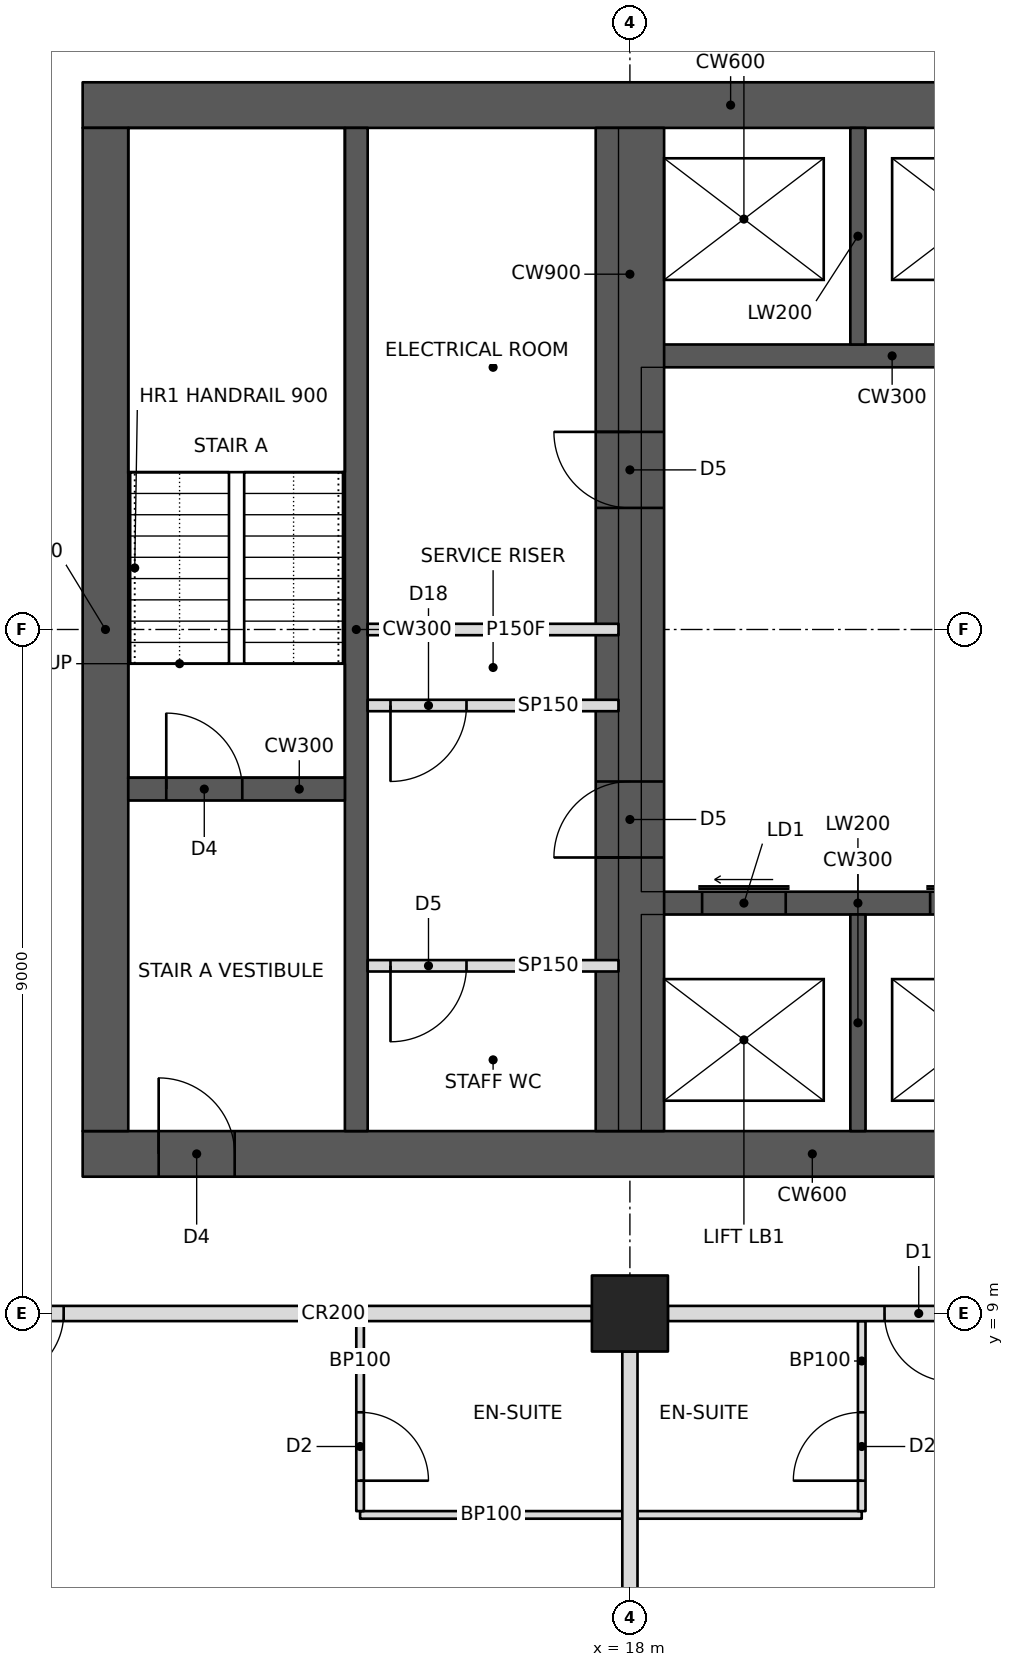
"""IFC4 building model, lengths in metres.
Left out: names, types, materials, properties, quantities, classifications, styles, units other than length and angle.
Written with IfcOpenShell. Run it as: python <this file> out.ifc"""

import sys

from ifc_helpers import new_model, si_unit, direction, frame, frame_2d, origin, origin_2d, place, context, subcontext, project, spatial, rectangle, hollow_rectangle, extrude, element, fill, save


model = new_model("IFC4")
c1 = context("Model", 3, precision=1e-05, world=origin(), true_north=direction((0.0, 1.0)))
c2 = subcontext(c1, "Body", "Model", "MODEL_VIEW")
j1 = project(units=[si_unit("LENGTHUNIT", "METRE"), si_unit("PLANEANGLEUNIT", "RADIAN")], contexts=[c1])
p1 = place(None, origin())
s1 = spatial("IfcSite", under=j1, at=p1, CompositionType="ELEMENT")
p2 = place(p1, origin())
s2 = spatial("IfcBuilding", under=s1, at=p2, CompositionType="ELEMENT")
p3 = place(p2, frame((0.0, 0.0, 152.0)))
s3 = spatial("IfcBuildingStorey", under=s2, at=p3, CompositionType="ELEMENT", Elevation=152.0)
p4 = place(p3, frame((18.0, 9.0, 0.0), z_axis=(0.0, 0.0, 1.0), x_axis=(1.0, 0.0, 0.0)))
e1 = element("IfcColumn", 1, at=p4, inside=s3, PredefinedType="COLUMN", context=c2, shape_type="SweptSolid", body=[
    extrude(hollow_rectangle(XDim=1.0, YDim=1.0, WallThickness=0.1, at=origin_2d()), origin(), (0.0, 0.0, 1.0), 3.4),
])
p5 = place(p3, frame((10.8, 11.1, 0.0), z_axis=(0.0, 0.0, 1.0), x_axis=(1.0, 0.0, 0.0)))
e2 = element("IfcWall", 2, at=p5, inside=s3, PredefinedType="SHEAR", context=c2, shape_type="SweptSolid", body=[
    extrude(rectangle(XDim=23.4, YDim=0.6, at=frame_2d((11.7, 0.0))), origin(), (0.0, 0.0, 1.0), 3.4),
])
p6 = place(p5, frame((1.0, 0.0, 0.0)))
e3 = element("IfcOpeningElement", 3, at=p6, cuts=e2, PredefinedType="OPENING", context=c2, shape_type="SweptSolid", body=[
    extrude(rectangle(XDim=1.0, YDim=2.1, at=frame_2d((0.5, 1.05))), frame((0.0, 0.31, 0.0), z_axis=(0.0, -1.0, 0.0), x_axis=(1.0, 0.0, 0.0)), (0.0, 0.0, 1.0), 0.62),
])
p7 = place(p5, frame((17.2, 0.0, 0.0)))
e4 = element("IfcOpeningElement", 4, at=p7, cuts=e2, PredefinedType="OPENING", context=c2, shape_type="SweptSolid", body=[
    extrude(rectangle(XDim=1.8, YDim=2.1, at=frame_2d((0.9, 1.05))), frame((0.0, 0.31, 0.0), z_axis=(0.0, -1.0, 0.0), x_axis=(1.0, 0.0, 0.0)), (0.0, 0.0, 1.0), 0.62),
])
p8 = place(p3, frame((10.8, 24.9, 0.0), z_axis=(0.0, 0.0, 1.0), x_axis=(1.0, 0.0, 0.0)))
e5 = element("IfcWall", 5, at=p8, inside=s3, PredefinedType="SHEAR", context=c2, shape_type="SweptSolid", body=[
    extrude(rectangle(XDim=23.4, YDim=0.6, at=frame_2d((11.7, 0.0))), origin(), (0.0, 0.0, 1.0), 3.4),
])
p9 = place(p8, frame((17.2, 0.0, 0.0)))
e6 = element("IfcOpeningElement", 6, at=p9, cuts=e5, PredefinedType="OPENING", context=c2, shape_type="SweptSolid", body=[
    extrude(rectangle(XDim=1.8, YDim=2.1, at=frame_2d((0.9, 1.05))), frame((0.0, 0.31, 0.0), z_axis=(0.0, -1.0, 0.0), x_axis=(1.0, 0.0, 0.0)), (0.0, 0.0, 1.0), 0.62),
])
p10 = place(p8, frame((21.1, 0.0, 0.0)))
e7 = element("IfcOpeningElement", 7, at=p10, cuts=e5, PredefinedType="OPENING", context=c2, shape_type="SweptSolid", body=[
    extrude(rectangle(XDim=1.0, YDim=2.1, at=frame_2d((0.5, 1.05))), frame((0.0, 0.31, 0.0), z_axis=(0.0, -1.0, 0.0), x_axis=(1.0, 0.0, 0.0)), (0.0, 0.0, 1.0), 0.62),
])
p11 = place(p3, frame((11.1, 11.4, 0.0), z_axis=(0.0, 0.0, 1.0), x_axis=(0.0, 1.0, 0.0)))
e8 = element("IfcWall", 8, at=p11, inside=s3, PredefinedType="SHEAR", context=c2, shape_type="SweptSolid", body=[
    extrude(rectangle(XDim=13.2, YDim=0.6, at=frame_2d((6.6, 0.0))), origin(), (0.0, 0.0, 1.0), 3.4),
])
p12 = place(p3, frame((14.4, 11.4, 0.0), z_axis=(0.0, 0.0, 1.0), x_axis=(0.0, 1.0, 0.0)))
e9 = element("IfcWall", 9, at=p12, inside=s3, PredefinedType="SHEAR", context=c2, shape_type="SweptSolid", body=[
    extrude(rectangle(XDim=13.2, YDim=0.3, at=frame_2d((6.6, 0.0))), origin(), (0.0, 0.0, 1.0), 3.4),
])
p13 = place(p3, frame((11.4, 15.9, 0.0), z_axis=(0.0, 0.0, 1.0), x_axis=(1.0, 0.0, 0.0)))
e10 = element("IfcWall", 10, at=p13, inside=s3, PredefinedType="SHEAR", context=c2, shape_type="SweptSolid", body=[
    extrude(rectangle(XDim=2.85, YDim=0.3, at=frame_2d((1.425, 0.0))), origin(), (0.0, 0.0, 1.0), 3.4),
])
p14 = place(p13, frame((0.5, 0.0, 0.0)))
e11 = element("IfcOpeningElement", 11, at=p14, cuts=e10, PredefinedType="OPENING", context=c2, shape_type="SweptSolid", body=[
    extrude(rectangle(XDim=1.0, YDim=2.1, at=frame_2d((0.5, 1.05))), frame((0.0, 0.16, 0.0), z_axis=(0.0, -1.0, 0.0), x_axis=(1.0, 0.0, 0.0)), (0.0, 0.0, 1.0), 0.32),
])
p15 = place(p3, frame((18.0, 11.4, 0.0), z_axis=(0.0, 0.0, 1.0), x_axis=(0.0, 1.0, 0.0)))
e12 = element("IfcWall", 12, at=p15, inside=s3, PredefinedType="SHEAR", context=c2, shape_type="SweptSolid", body=[
    extrude(rectangle(XDim=13.2, YDim=0.9, at=frame_2d((6.6, 0.0))), origin(), (0.0, 0.0, 1.0), 3.4),
])
p16 = place(p15, frame((3.6, 0.0, 0.0)))
e13 = element("IfcOpeningElement", 13, at=p16, cuts=e12, PredefinedType="OPENING", context=c2, shape_type="SweptSolid", body=[
    extrude(rectangle(XDim=1.0, YDim=2.1, at=frame_2d((0.5, 1.05))), frame((0.0, 0.46, 0.0), z_axis=(0.0, -1.0, 0.0), x_axis=(1.0, 0.0, 0.0)), (0.0, 0.0, 1.0), 0.92),
])
p17 = place(p15, frame((8.2, 0.0, 0.0)))
e14 = element("IfcOpeningElement", 14, at=p17, cuts=e12, PredefinedType="OPENING", context=c2, shape_type="SweptSolid", body=[
    extrude(rectangle(XDim=1.0, YDim=2.1, at=frame_2d((0.5, 1.05))), frame((0.0, 0.46, 0.0), z_axis=(0.0, -1.0, 0.0), x_axis=(1.0, 0.0, 0.0)), (0.0, 0.0, 1.0), 0.92),
])
p18 = place(p3, frame((14.55, 18.0, 0.0), z_axis=(0.0, 0.0, 1.0), x_axis=(1.0, 0.0, 0.0)))
e15 = element("IfcWall", 15, at=p18, inside=s3, PredefinedType="PARTITIONING", context=c2, shape_type="SweptSolid", body=[
    extrude(rectangle(XDim=3.3, YDim=0.15, at=frame_2d((1.65, 0.0))), origin(), (0.0, 0.0, 1.0), 3.15),
])
p19 = place(p3, frame((18.15, 14.4, 0.0), z_axis=(0.0, 0.0, 1.0), x_axis=(1.0, 0.0, 0.0)))
e16 = element("IfcWall", 16, at=p19, inside=s3, PredefinedType="SHEAR", context=c2, shape_type="SweptSolid", body=[
    extrude(rectangle(XDim=9.0, YDim=0.3, at=frame_2d((4.5, 0.0))), origin(), (0.0, 0.0, 1.0), 3.4),
])
p20 = place(p19, frame((0.8, 0.0, 0.0)))
e17 = element("IfcOpeningElement", 17, at=p20, cuts=e16, PredefinedType="OPENING", context=c2, shape_type="SweptSolid", body=[
    extrude(rectangle(XDim=1.1, YDim=2.1, at=frame_2d((0.55, 1.05))), frame((0.0, 0.16, 0.0), z_axis=(0.0, -1.0, 0.0), x_axis=(1.0, 0.0, 0.0)), (0.0, 0.0, 1.0), 0.32),
])
p21 = place(p19, frame((3.8, 0.0, 0.0)))
e18 = element("IfcOpeningElement", 18, at=p21, cuts=e16, PredefinedType="OPENING", context=c2, shape_type="SweptSolid", body=[
    extrude(rectangle(XDim=1.1, YDim=2.1, at=frame_2d((0.55, 1.05))), frame((0.0, 0.16, 0.0), z_axis=(0.0, -1.0, 0.0), x_axis=(1.0, 0.0, 0.0)), (0.0, 0.0, 1.0), 0.32),
])
p22 = place(p19, frame((6.75, 0.0, 0.0)))
e19 = element("IfcOpeningElement", 19, at=p22, cuts=e16, PredefinedType="OPENING", context=c2, shape_type="SweptSolid", body=[
    extrude(rectangle(XDim=1.2, YDim=2.1, at=frame_2d((0.6, 1.05))), frame((0.0, 0.16, 0.0), z_axis=(0.0, -1.0, 0.0), x_axis=(1.0, 0.0, 0.0)), (0.0, 0.0, 1.0), 0.32),
])
p23 = place(p3, frame((21.0, 11.4, 0.0), z_axis=(0.0, 0.0, 1.0), x_axis=(0.0, 1.0, 0.0)))
e20 = element("IfcWall", 20, at=p23, inside=s3, PredefinedType="SHEAR", context=c2, shape_type="SweptSolid", body=[
    extrude(rectangle(XDim=2.85, YDim=0.2, at=frame_2d((1.425, 0.0))), origin(), (0.0, 0.0, 1.0), 3.4),
])
p24 = place(p3, frame((18.15, 21.6, 0.0), z_axis=(0.0, 0.0, 1.0), x_axis=(1.0, 0.0, 0.0)))
e21 = element("IfcWall", 21, at=p24, inside=s3, PredefinedType="SHEAR", context=c2, shape_type="SweptSolid", body=[
    extrude(rectangle(XDim=9.0, YDim=0.3, at=frame_2d((4.5, 0.0))), origin(), (0.0, 0.0, 1.0), 3.4),
])
p25 = place(p24, frame((6.75, 0.0, 0.0)))
e22 = element("IfcOpeningElement", 22, at=p25, cuts=e21, PredefinedType="OPENING", context=c2, shape_type="SweptSolid", body=[
    extrude(rectangle(XDim=1.2, YDim=2.1, at=frame_2d((0.6, 1.05))), frame((0.0, 0.16, 0.0), z_axis=(0.0, -1.0, 0.0), x_axis=(1.0, 0.0, 0.0)), (0.0, 0.0, 1.0), 0.32),
])
p26 = place(p3, frame((21.0, 21.75, 0.0), z_axis=(0.0, 0.0, 1.0), x_axis=(0.0, 1.0, 0.0)))
e23 = element("IfcWall", 23, at=p26, inside=s3, PredefinedType="SHEAR", context=c2, shape_type="SweptSolid", body=[
    extrude(rectangle(XDim=2.85, YDim=0.2, at=frame_2d((1.425, 0.0))), origin(), (0.0, 0.0, 1.0), 3.4),
])
p27 = place(p3, frame((9.5, 9.0, 0.0), z_axis=(0.0, 0.0, 1.0), x_axis=(1.0, 0.0, 0.0)))
e24 = element("IfcWall", 24, at=p27, inside=s3, PredefinedType="PARTITIONING", context=c2, shape_type="SweptSolid", body=[
    extrude(rectangle(XDim=8.0, YDim=0.2, at=frame_2d((4.0, 0.0))), origin(), (0.0, 0.0, 1.0), 2.21),
])
p28 = place(p27, frame((0.15, 0.0, 0.0)))
e25 = element("IfcOpeningElement", 25, at=p28, cuts=e24, PredefinedType="OPENING", context=c2, shape_type="SweptSolid", body=[
    extrude(rectangle(XDim=0.9, YDim=2.1, at=frame_2d((0.45, 1.05))), frame((0.0, 0.11, 0.0), z_axis=(0.0, -1.0, 0.0), x_axis=(1.0, 0.0, 0.0)), (0.0, 0.0, 1.0), 0.22),
])
p29 = place(p3, frame((18.5, 9.0, 0.0), z_axis=(0.0, 0.0, 1.0), x_axis=(1.0, 0.0, 0.0)))
e26 = element("IfcWall", 26, at=p29, inside=s3, PredefinedType="PARTITIONING", context=c2, shape_type="SweptSolid", body=[
    extrude(rectangle(XDim=8.0, YDim=0.2, at=frame_2d((4.0, 0.0))), origin(), (0.0, 0.0, 1.0), 2.21),
])
p30 = place(p29, frame((2.85, 0.0, 0.0)))
e27 = element("IfcOpeningElement", 27, at=p30, cuts=e26, PredefinedType="OPENING", context=c2, shape_type="SweptSolid", body=[
    extrude(rectangle(XDim=0.9, YDim=2.1, at=frame_2d((0.45, 1.05))), frame((0.0, 0.11, 0.0), z_axis=(0.0, -1.0, 0.0), x_axis=(1.0, 0.0, 0.0)), (0.0, 0.0, 1.0), 0.22),
])
p31 = place(p29, frame((4.25, 0.0, 0.0)))
e28 = element("IfcOpeningElement", 28, at=p31, cuts=e26, PredefinedType="OPENING", context=c2, shape_type="SweptSolid", body=[
    extrude(rectangle(XDim=0.9, YDim=2.1, at=frame_2d((0.45, 1.05))), frame((0.0, 0.11, 0.0), z_axis=(0.0, -1.0, 0.0), x_axis=(1.0, 0.0, 0.0)), (0.0, 0.0, 1.0), 0.22),
])
p32 = place(p3, frame((18.0, 8.5, 0.0), z_axis=(0.0, 0.0, 1.0), x_axis=(0.0, -1.0, 0.0)))
e29 = element("IfcWall", 29, at=p32, inside=s3, PredefinedType="PARTITIONING", context=c2, shape_type="SweptSolid", body=[
    extrude(rectangle(XDim=7.5, YDim=0.2, at=frame_2d((3.75, 0.0))), origin(), (0.0, 0.0, 1.0), 2.203),
])
p33 = place(p3, frame((14.45, 6.35, 0.0), z_axis=(0.0, 0.0, 1.0), x_axis=(1.0, 0.0, 0.0)))
e30 = element("IfcWall", 30, at=p33, inside=s3, PredefinedType="PARTITIONING", context=c2, shape_type="SweptSolid", body=[
    extrude(rectangle(XDim=3.45, YDim=0.1, at=frame_2d((1.725, 0.0))), origin(), (0.0, 0.0, 1.0), 2.202),
])
p34 = place(p3, frame((14.45, 8.9, 0.0), z_axis=(0.0, 0.0, 1.0), x_axis=(0.0, -1.0, 0.0)))
e31 = element("IfcWall", 31, at=p34, inside=s3, PredefinedType="PARTITIONING", context=c2, shape_type="SweptSolid", body=[
    extrude(rectangle(XDim=2.5, YDim=0.1, at=frame_2d((1.25, 0.0))), origin(), (0.0, 0.0, 1.0), 2.21),
])
p35 = place(p34, frame((1.2, 0.0, 0.0)))
e32 = element("IfcOpeningElement", 32, at=p35, cuts=e31, PredefinedType="OPENING", context=c2, shape_type="SweptSolid", body=[
    extrude(rectangle(XDim=0.9, YDim=2.1, at=frame_2d((0.45, 1.05))), frame((0.0, 0.06, 0.0), z_axis=(0.0, -1.0, 0.0), x_axis=(1.0, 0.0, 0.0)), (0.0, 0.0, 1.0), 0.12),
])
p36 = place(p3, frame((18.1, 6.35, 0.0), z_axis=(0.0, 0.0, 1.0), x_axis=(1.0, 0.0, 0.0)))
e33 = element("IfcWall", 33, at=p36, inside=s3, PredefinedType="PARTITIONING", context=c2, shape_type="SweptSolid", body=[
    extrude(rectangle(XDim=2.95, YDim=0.1, at=frame_2d((1.475, 0.0))), origin(), (0.0, 0.0, 1.0), 2.202),
])
p37 = place(p3, frame((21.05, 8.9, 0.0), z_axis=(0.0, 0.0, 1.0), x_axis=(0.0, -1.0, 0.0)))
e34 = element("IfcWall", 34, at=p37, inside=s3, PredefinedType="PARTITIONING", context=c2, shape_type="SweptSolid", body=[
    extrude(rectangle(XDim=2.5, YDim=0.1, at=frame_2d((1.25, 0.0))), origin(), (0.0, 0.0, 1.0), 2.21),
])
p38 = place(p37, frame((1.2, 0.0, 0.0)))
e35 = element("IfcOpeningElement", 35, at=p38, cuts=e34, PredefinedType="OPENING", context=c2, shape_type="SweptSolid", body=[
    extrude(rectangle(XDim=0.9, YDim=2.1, at=frame_2d((0.45, 1.05))), frame((0.0, 0.06, 0.0), z_axis=(0.0, -1.0, 0.0), x_axis=(1.0, 0.0, 0.0)), (0.0, 0.0, 1.0), 0.12),
])
p39 = place(p3, frame((14.55, 17.0, 0.0), z_axis=(0.0, 0.0, 1.0), x_axis=(1.0, 0.0, 0.0)))
e36 = element("IfcWall", 36, at=p39, inside=s3, PredefinedType="PARTITIONING", context=c2, shape_type="SweptSolid", body=[
    extrude(rectangle(XDim=3.3, YDim=0.15, at=frame_2d((1.65, 0.0))), origin(), (0.0, 0.0, 1.0), 3.15),
])
p40 = place(p39, frame((0.3, 0.0, 0.0)))
e37 = element("IfcOpeningElement", 37, at=p40, cuts=e36, PredefinedType="OPENING", context=c2, shape_type="SweptSolid", body=[
    extrude(rectangle(XDim=1.0, YDim=2.1, at=frame_2d((0.5, 1.05))), frame((0.0, 0.085, 0.0), z_axis=(0.0, -1.0, 0.0), x_axis=(1.0, 0.0, 0.0)), (0.0, 0.0, 1.0), 0.17),
])
p41 = place(p3, frame((14.55, 13.575, 0.0), z_axis=(0.0, 0.0, 1.0), x_axis=(1.0, 0.0, 0.0)))
e38 = element("IfcWall", 38, at=p41, inside=s3, PredefinedType="PARTITIONING", context=c2, shape_type="SweptSolid", body=[
    extrude(rectangle(XDim=3.3, YDim=0.15, at=frame_2d((1.65, 0.0))), origin(), (0.0, 0.0, 1.0), 3.15),
])
p42 = place(p41, frame((0.3, 0.0, 0.0)))
e39 = element("IfcOpeningElement", 39, at=p42, cuts=e38, PredefinedType="OPENING", context=c2, shape_type="SweptSolid", body=[
    extrude(rectangle(XDim=1.0, YDim=2.1, at=frame_2d((0.5, 1.05))), frame((0.0, 0.085, 0.0), z_axis=(0.0, -1.0, 0.0), x_axis=(1.0, 0.0, 0.0)), (0.0, 0.0, 1.0), 0.17),
])
p43 = place(p35, origin())
e40 = element("IfcDoor", 40, at=p43, inside=s3, OperationType="SINGLE_SWING_RIGHT", PredefinedType="DOOR", context=c2, shape_type="SweptSolid", body=[
    extrude(rectangle(XDim=0.9, YDim=2.1, at=frame_2d((0.45, 1.05))), frame((0.0, 0.025, 0.0), z_axis=(0.0, -1.0, 0.0), x_axis=(1.0, 0.0, 0.0)), (0.0, 0.0, 1.0), 0.05),
])
fill(e32, e40)
p44 = place(p28, frame((0.9, 0.0, 0.0), z_axis=(0.0, 0.0, 1.0), x_axis=(-1.0, 0.0, 0.0)))
e41 = element("IfcDoor", 41, at=p44, inside=s3, OperationType="SINGLE_SWING_RIGHT", PredefinedType="DOOR", context=c2, shape_type="SweptSolid", body=[
    extrude(rectangle(XDim=0.9, YDim=2.1, at=frame_2d((0.45, 1.05))), frame((0.0, 0.025, 0.0), z_axis=(0.0, -1.0, 0.0), x_axis=(1.0, 0.0, 0.0)), (0.0, 0.0, 1.0), 0.05),
])
fill(e25, e41)
p45 = place(p38, frame((0.9, 0.0, 0.0), z_axis=(0.0, 0.0, 1.0), x_axis=(-1.0, 0.0, 0.0)))
e42 = element("IfcDoor", 42, at=p45, inside=s3, OperationType="SINGLE_SWING_LEFT", PredefinedType="DOOR", context=c2, shape_type="SweptSolid", body=[
    extrude(rectangle(XDim=0.9, YDim=2.1, at=frame_2d((0.45, 1.05))), frame((0.0, 0.025, 0.0), z_axis=(0.0, -1.0, 0.0), x_axis=(1.0, 0.0, 0.0)), (0.0, 0.0, 1.0), 0.05),
])
fill(e35, e42)
p46 = place(p30, frame((0.9, 0.0, 0.0), z_axis=(0.0, 0.0, 1.0), x_axis=(-1.0, 0.0, 0.0)))
e43 = element("IfcDoor", 43, at=p46, inside=s3, OperationType="SINGLE_SWING_LEFT", PredefinedType="DOOR", context=c2, shape_type="SweptSolid", body=[
    extrude(rectangle(XDim=0.9, YDim=2.1, at=frame_2d((0.45, 1.05))), frame((0.0, 0.025, 0.0), z_axis=(0.0, -1.0, 0.0), x_axis=(1.0, 0.0, 0.0)), (0.0, 0.0, 1.0), 0.05),
])
fill(e27, e43)
p47 = place(p40, frame((1.0, 0.0, 0.0), z_axis=(0.0, 0.0, 1.0), x_axis=(-1.0, 0.0, 0.0)))
e44 = element("IfcDoor", 44, at=p47, inside=s3, OperationType="SINGLE_SWING_RIGHT", PredefinedType="DOOR", context=c2, shape_type="SweptSolid", body=[
    extrude(rectangle(XDim=1.0, YDim=2.1, at=frame_2d((0.5, 1.05))), frame((0.0, 0.025, 0.0), z_axis=(0.0, -1.0, 0.0), x_axis=(1.0, 0.0, 0.0)), (0.0, 0.0, 1.0), 0.05),
])
fill(e37, e44)
p48 = place(p42, frame((1.0, 0.0, 0.0), z_axis=(0.0, 0.0, 1.0), x_axis=(-1.0, 0.0, 0.0)))
e45 = element("IfcDoor", 45, at=p48, inside=s3, OperationType="SINGLE_SWING_RIGHT", PredefinedType="DOOR", context=c2, shape_type="SweptSolid", body=[
    extrude(rectangle(XDim=1.0, YDim=2.1, at=frame_2d((0.5, 1.05))), frame((0.0, 0.025, 0.0), z_axis=(0.0, -1.0, 0.0), x_axis=(1.0, 0.0, 0.0)), (0.0, 0.0, 1.0), 0.05),
])
fill(e39, e45)
p49 = place(p6, origin())
e46 = element("IfcDoor", 46, at=p49, inside=s3, OperationType="SINGLE_SWING_LEFT", PredefinedType="DOOR", context=c2, shape_type="SweptSolid", body=[
    extrude(rectangle(XDim=1.0, YDim=2.1, at=frame_2d((0.5, 1.05))), frame((0.0, 0.025, 0.0), z_axis=(0.0, -1.0, 0.0), x_axis=(1.0, 0.0, 0.0)), (0.0, 0.0, 1.0), 0.05),
])
fill(e3, e46)
p50 = place(p14, origin())
e47 = element("IfcDoor", 47, at=p50, inside=s3, OperationType="SINGLE_SWING_LEFT", PredefinedType="DOOR", context=c2, shape_type="SweptSolid", body=[
    extrude(rectangle(XDim=1.0, YDim=2.1, at=frame_2d((0.5, 1.05))), frame((0.0, 0.025, 0.0), z_axis=(0.0, -1.0, 0.0), x_axis=(1.0, 0.0, 0.0)), (0.0, 0.0, 1.0), 0.05),
])
fill(e11, e47)
p51 = place(p16, origin())
e48 = element("IfcDoor", 48, at=p51, inside=s3, OperationType="SINGLE_SWING_LEFT", PredefinedType="DOOR", context=c2, shape_type="SweptSolid", body=[
    extrude(rectangle(XDim=1.0, YDim=2.1, at=frame_2d((0.5, 1.05))), frame((0.0, 0.025, 0.0), z_axis=(0.0, -1.0, 0.0), x_axis=(1.0, 0.0, 0.0)), (0.0, 0.0, 1.0), 0.05),
])
fill(e13, e48)
p52 = place(p17, origin())
e49 = element("IfcDoor", 49, at=p52, inside=s3, OperationType="SINGLE_SWING_RIGHT", PredefinedType="DOOR", context=c2, shape_type="SweptSolid", body=[
    extrude(rectangle(XDim=1.0, YDim=2.1, at=frame_2d((0.5, 1.05))), frame((0.0, 0.025, 0.0), z_axis=(0.0, -1.0, 0.0), x_axis=(1.0, 0.0, 0.0)), (0.0, 0.0, 1.0), 0.05),
])
fill(e14, e49)
p53 = place(p20, origin())
e50 = element("IfcDoor", 50, at=p53, inside=s3, OperationType="SLIDING_TO_LEFT", PredefinedType="DOOR", context=c2, shape_type="SweptSolid", body=[
    extrude(rectangle(XDim=1.1, YDim=2.1, at=frame_2d((0.55, 1.05))), frame((0.0, 0.025, 0.0), z_axis=(0.0, -1.0, 0.0), x_axis=(1.0, 0.0, 0.0)), (0.0, 0.0, 1.0), 0.05),
])
fill(e17, e50)
p54 = place(p21, origin())
e51 = element("IfcDoor", 51, at=p54, inside=s3, OperationType="SLIDING_TO_LEFT", PredefinedType="DOOR", context=c2, shape_type="SweptSolid", body=[
    extrude(rectangle(XDim=1.1, YDim=2.1, at=frame_2d((0.55, 1.05))), frame((0.0, 0.025, 0.0), z_axis=(0.0, -1.0, 0.0), x_axis=(1.0, 0.0, 0.0)), (0.0, 0.0, 1.0), 0.05),
])
fill(e18, e51)
save(model, sys.argv[1])
